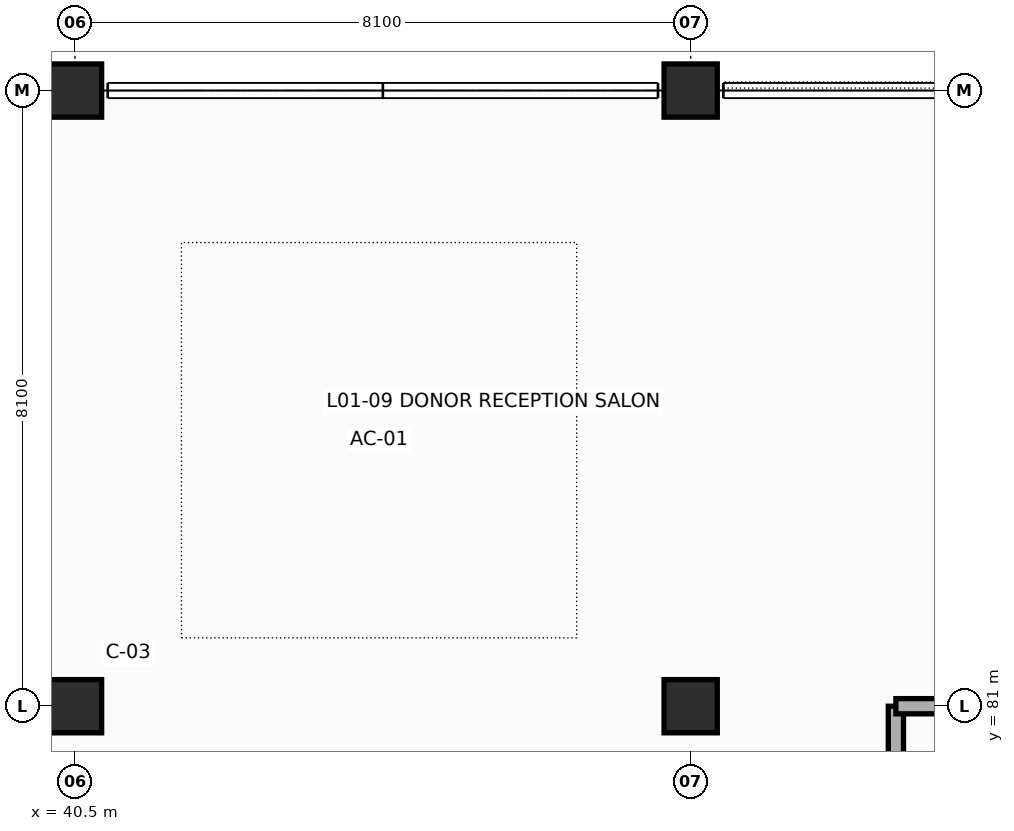
"""IFC4 building model, lengths in metres.
Left out: names, types, materials, properties, quantities, classifications, styles, units other than length and angle.
Written with IfcOpenShell. Run it as: python <this file> out.ifc"""

import sys

from ifc_helpers import new_model, si_unit, direction, frame, frame_2d, origin, origin_2d, place, context, subcontext, project, spatial, rectangle, extrude, element, save


model = new_model("IFC4")
c1 = context("Model", 3, precision=1e-05, world=origin(), true_north=direction((0.0, 1.0)))
c2 = subcontext(c1, "Body", "Model", "MODEL_VIEW")
j1 = project(units=[si_unit("LENGTHUNIT", "METRE"), si_unit("PLANEANGLEUNIT", "RADIAN")], contexts=[c1])
p1 = place(None, origin())
s1 = spatial("IfcSite", under=j1, at=p1, CompositionType="ELEMENT")
p2 = place(p1, origin())
s2 = spatial("IfcBuilding", under=s1, at=p2, CompositionType="ELEMENT")
p3 = place(p2, frame((0.0, 0.0, 5.4)))
s3 = spatial("IfcBuildingStorey", under=s2, at=p3, CompositionType="ELEMENT", Elevation=5.4)
for number, where, z_axis, x_axis in (
    (1, (40.5, 81.0, 0.0), (0.0, 0.0, 1.0), (1.0, 0.0, 0.0)),
    (2, (40.5, 89.1, 0.0), (0.0, 0.0, 1.0), (1.0, 0.0, 0.0)),
    (3, (48.6, 81.0, 0.0), (0.0, 0.0, 1.0), (1.0, 0.0, 0.0)),
    (4, (48.6, 89.1, 0.0), (0.0, 0.0, 1.0), (1.0, 0.0, 0.0)),
):
    element("IfcColumn", number, at=place(p3, frame(where, z_axis=z_axis, x_axis=x_axis)), inside=s3, PredefinedType="COLUMN", context=c2, shape_type="SweptSolid", body=[
        extrude(rectangle(XDim=0.7, YDim=0.7, at=origin_2d()), origin(), (0.0, 0.0, 1.0), 4.8),
    ])
p4 = place(p3, frame((51.3, 72.9, 0.0), z_axis=(0.0, 0.0, 1.0), x_axis=(0.0, 1.0, 0.0)))
e5 = element("IfcWall", 5, at=p4, inside=s3, PredefinedType="PARTITIONING", context=c2, shape_type="SweptSolid", body=[
    extrude(rectangle(XDim=8.1, YDim=0.2, at=frame_2d((4.05, 0.0))), origin(), (0.0, 0.0, 1.0), 4.5),
])
p5 = place(p4, frame((3.15, 0.0, 0.0)))
e6 = element("IfcOpeningElement", 6, at=p5, cuts=e5, PredefinedType="OPENING", context=c2, shape_type="SweptSolid", body=[
    extrude(rectangle(XDim=1.8, YDim=2.25, at=frame_2d((0.9, 1.125))), frame((0.0, 0.11, 0.0), z_axis=(0.0, -1.0, 0.0), x_axis=(1.0, 0.0, 0.0)), (0.0, 0.0, 1.0), 0.22),
])
p6 = place(p3, frame((51.3, 81.0, 0.0), z_axis=(0.0, 0.0, 1.0), x_axis=(1.0, 0.0, 0.0)))
e7 = element("IfcWall", 7, at=p6, inside=s3, PredefinedType="PARTITIONING", context=c2, shape_type="SweptSolid", body=[
    extrude(rectangle(XDim=5.05, YDim=0.2, at=frame_2d((2.525, 0.0))), origin(), (0.0, 0.0, 1.0), 4.021),
])
save(model, sys.argv[1])
